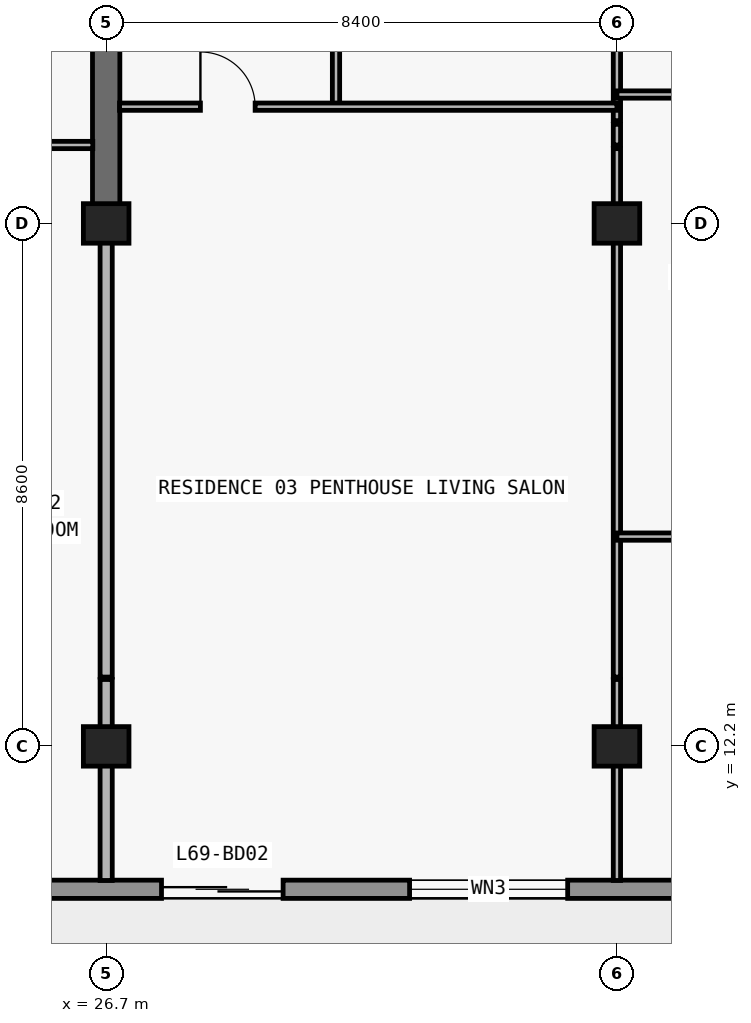
"""IFC4 building model, lengths in metres.
Left out: names, types, materials, properties, quantities, classifications, styles, units other than length and angle.
Written with IfcOpenShell. Run it as: python <this file> out.ifc"""

import sys

from ifc_helpers import new_model, si_unit, direction, frame, frame_2d, origin, origin_2d, place, context, subcontext, project, spatial, rectangle, extrude, element, fill, save


model = new_model("IFC4")
c1 = context("Model", 3, precision=1e-05, world=origin(), true_north=direction((0.0, 1.0)))
c2 = subcontext(c1, "Body", "Model", "MODEL_VIEW")
j1 = project(units=[si_unit("LENGTHUNIT", "METRE"), si_unit("PLANEANGLEUNIT", "RADIAN")], contexts=[c1])
p1 = place(None, origin())
s1 = spatial("IfcSite", under=j1, at=p1, CompositionType="ELEMENT")
p2 = place(p1, origin())
s2 = spatial("IfcBuilding", under=s1, at=p2, CompositionType="ELEMENT")
p3 = place(p2, frame((0.0, 0.0, 246.3)))
s3 = spatial("IfcBuildingStorey", under=s2, at=p3, CompositionType="ELEMENT", Elevation=246.3)
for number, where, z_axis, x_axis in (
    (1, (26.7, 12.2, 0.0), (0.0, 0.0, 1.0), (1.0, 0.0, 0.0)),
    (2, (35.1, 12.2, 0.0), (0.0, 0.0, 1.0), (1.0, 0.0, 0.0)),
    (3, (26.7, 20.8, 0.0), (0.0, 0.0, 1.0), (1.0, 0.0, 0.0)),
    (4, (35.1, 20.8, 0.0), (0.0, 0.0, 1.0), (1.0, 0.0, 0.0)),
):
    element("IfcColumn", number, at=place(p3, frame(where, z_axis=z_axis, x_axis=x_axis)), inside=s3, PredefinedType="COLUMN", context=c2, shape_type="SweptSolid", body=[
        extrude(rectangle(XDim=0.75, YDim=0.65, at=origin_2d()), origin(), (0.0, 0.0, 1.0), 3.05),
    ])
p4 = place(p3, frame((26.7, 20.8, 0.0), z_axis=(0.0, 0.0, 1.0), x_axis=(0.0, 1.0, 0.0)))
e5 = element("IfcWall", 5, at=p4, inside=s3, PredefinedType="SHEAR", context=c2, shape_type="SweptSolid", body=[
    extrude(rectangle(XDim=8.6, YDim=0.45, at=frame_2d((4.3, 0.0))), origin(), (0.0, 0.0, 1.0), 3.05),
])
p5 = place(p3, frame((65.7, 9.85, 0.0), z_axis=(0.0, 0.0, 1.0), x_axis=(-1.0, 0.0, 0.0)))
e6 = element("IfcWall", 6, at=p5, inside=s3, PredefinedType="STANDARD", context=c2, shape_type="SweptSolid", body=[
    extrude(rectangle(XDim=53.6, YDim=0.3, at=frame_2d((26.8, 0.0))), origin(), (0.0, 0.0, 1.0), 3.05),
])
p6 = place(p5, frame((48.05, 0.0, 0.85)))
e7 = element("IfcOpeningElement", 7, at=p6, cuts=e6, PredefinedType="OPENING", context=c2, shape_type="SweptSolid", body=[
    extrude(rectangle(XDim=1.8, YDim=1.55, at=frame_2d((0.9, 0.775))), frame((0.0, 0.16, 0.0), z_axis=(0.0, -1.0, 0.0), x_axis=(1.0, 0.0, 0.0)), (0.0, 0.0, 1.0), 0.32),
])
p7 = place(p5, frame((44.09, 0.0, 0.0)))
e8 = element("IfcOpeningElement", 8, at=p7, cuts=e6, PredefinedType="OPENING", context=c2, shape_type="SweptSolid", body=[
    extrude(rectangle(XDim=2.0, YDim=2.3, at=frame_2d((1.0, 1.15))), frame((0.0, 0.16, 0.0), z_axis=(0.0, -1.0, 0.0), x_axis=(1.0, 0.0, 0.0)), (0.0, 0.0, 1.0), 0.32),
])
p8 = place(p5, frame((39.99, 0.0, 0.85)))
e9 = element("IfcOpeningElement", 9, at=p8, cuts=e6, PredefinedType="OPENING", context=c2, shape_type="SweptSolid", body=[
    extrude(rectangle(XDim=1.8, YDim=1.55, at=frame_2d((0.9, 0.775))), frame((0.0, 0.16, 0.0), z_axis=(0.0, -1.0, 0.0), x_axis=(1.0, 0.0, 0.0)), (0.0, 0.0, 1.0), 0.32),
])
p9 = place(p5, frame((36.09, 0.0, 0.0)))
e10 = element("IfcOpeningElement", 10, at=p9, cuts=e6, PredefinedType="OPENING", context=c2, shape_type="SweptSolid", body=[
    extrude(rectangle(XDim=2.0, YDim=2.3, at=frame_2d((1.0, 1.15))), frame((0.0, 0.16, 0.0), z_axis=(0.0, -1.0, 0.0), x_axis=(1.0, 0.0, 0.0)), (0.0, 0.0, 1.0), 0.32),
])
p10 = place(p5, frame((31.41, 0.0, 0.65)))
e11 = element("IfcOpeningElement", 11, at=p10, cuts=e6, PredefinedType="OPENING", context=c2, shape_type="SweptSolid", body=[
    extrude(rectangle(XDim=2.6, YDim=1.85, at=frame_2d((1.3, 0.925))), frame((0.0, 0.16, 0.0), z_axis=(0.0, -1.0, 0.0), x_axis=(1.0, 0.0, 0.0)), (0.0, 0.0, 1.0), 0.32),
])
p11 = place(p5, frame((25.7, 0.0, 0.85)))
e12 = element("IfcOpeningElement", 12, at=p11, cuts=e6, PredefinedType="OPENING", context=c2, shape_type="SweptSolid", body=[
    extrude(rectangle(XDim=2.2, YDim=1.55, at=frame_2d((1.1, 0.775))), frame((0.0, 0.16, 0.0), z_axis=(0.0, -1.0, 0.0), x_axis=(1.0, 0.0, 0.0)), (0.0, 0.0, 1.0), 0.32),
])
p12 = place(p5, frame((17.7, 0.0, 0.85)))
e13 = element("IfcOpeningElement", 13, at=p12, cuts=e6, PredefinedType="OPENING", context=c2, shape_type="SweptSolid", body=[
    extrude(rectangle(XDim=2.2, YDim=1.55, at=frame_2d((1.1, 0.775))), frame((0.0, 0.16, 0.0), z_axis=(0.0, -1.0, 0.0), x_axis=(1.0, 0.0, 0.0)), (0.0, 0.0, 1.0), 0.32),
])
p13 = place(p5, frame((11.29, 0.0, 0.0)))
e14 = element("IfcOpeningElement", 14, at=p13, cuts=e6, PredefinedType="OPENING", context=c2, shape_type="SweptSolid", body=[
    extrude(rectangle(XDim=2.0, YDim=2.3, at=frame_2d((1.0, 1.15))), frame((0.0, 0.16, 0.0), z_axis=(0.0, -1.0, 0.0), x_axis=(1.0, 0.0, 0.0)), (0.0, 0.0, 1.0), 0.32),
])
p14 = place(p5, frame((7.19, 0.0, 0.85)))
e15 = element("IfcOpeningElement", 15, at=p14, cuts=e6, PredefinedType="OPENING", context=c2, shape_type="SweptSolid", body=[
    extrude(rectangle(XDim=1.8, YDim=1.55, at=frame_2d((0.9, 0.775))), frame((0.0, 0.16, 0.0), z_axis=(0.0, -1.0, 0.0), x_axis=(1.0, 0.0, 0.0)), (0.0, 0.0, 1.0), 0.32),
])
p15 = place(p5, frame((0.65, 0.0, 0.85)))
e16 = element("IfcOpeningElement", 16, at=p15, cuts=e6, PredefinedType="OPENING", context=c2, shape_type="SweptSolid", body=[
    extrude(rectangle(XDim=1.8, YDim=1.55, at=frame_2d((0.9, 0.775))), frame((0.0, 0.16, 0.0), z_axis=(0.0, -1.0, 0.0), x_axis=(1.0, 0.0, 0.0)), (0.0, 0.0, 1.0), 0.32),
])
p16 = place(p3, frame((26.7, 9.995, 0.0), z_axis=(0.0, 0.0, 1.0), x_axis=(0.0, 1.0, 0.0)))
e17 = element("IfcWall", 17, at=p16, inside=s3, PredefinedType="PARTITIONING", context=c2, shape_type="SweptSolid", body=[
    extrude(rectangle(XDim=3.305, YDim=0.2, at=frame_2d((1.652, 0.0))), origin(), (0.0, 0.0, 1.0), 2.263),
])
p17 = place(p3, frame((26.7, 13.34, 0.0), z_axis=(0.0, 0.0, 1.0), x_axis=(0.0, 1.0, 0.0)))
e18 = element("IfcWall", 18, at=p17, inside=s3, PredefinedType="PARTITIONING", context=c2, shape_type="SweptSolid", body=[
    extrude(rectangle(XDim=7.455, YDim=0.2, at=frame_2d((3.728, 0.0))), origin(), (0.0, 0.0, 1.0), 2.263),
])
p18 = place(p3, frame((30.48, 22.72, 0.0), z_axis=(0.0, 0.0, 1.0), x_axis=(0.0, 1.0, 0.0)))
e19 = element("IfcWall", 19, at=p18, inside=s3, PredefinedType="PARTITIONING", context=c2, shape_type="SweptSolid", body=[
    extrude(rectangle(XDim=4.46, YDim=0.12, at=frame_2d((2.23, 0.0))), origin(), (0.0, 0.0, 1.0), 3.05),
])
p19 = place(p18, frame((1.78, 0.0, 0.0)))
e20 = element("IfcOpeningElement", 20, at=p19, cuts=e19, PredefinedType="OPENING", context=c2, shape_type="SweptSolid", body=[
    extrude(rectangle(XDim=0.9, YDim=2.15, at=frame_2d((0.45, 1.075))), frame((0.0, 0.07, 0.0), z_axis=(0.0, -1.0, 0.0), x_axis=(1.0, 0.0, 0.0)), (0.0, 0.0, 1.0), 0.14),
])
p20 = place(p3, frame((35.1, 9.995, 0.0), z_axis=(0.0, 0.0, 1.0), x_axis=(0.0, 1.0, 0.0)))
e21 = element("IfcWall", 21, at=p20, inside=s3, PredefinedType="PARTITIONING", context=c2, shape_type="SweptSolid", body=[
    extrude(rectangle(XDim=3.305, YDim=0.12, at=frame_2d((1.652, 0.0))), origin(), (0.0, 0.0, 1.0), 2.263),
])
p21 = place(p3, frame((35.1, 13.34, 0.0), z_axis=(0.0, 0.0, 1.0), x_axis=(0.0, 1.0, 0.0)))
e22 = element("IfcWall", 22, at=p21, inside=s3, PredefinedType="PARTITIONING", context=c2, shape_type="SweptSolid", body=[
    extrude(rectangle(XDim=8.69, YDim=0.12, at=frame_2d((4.345, 0.0))), origin(), (0.0, 0.0, 1.0), 2.263),
])
p22 = place(p3, frame((35.1, 22.09, 0.0), z_axis=(0.0, 0.0, 1.0), x_axis=(0.0, 1.0, 0.0)))
e23 = element("IfcWall", 23, at=p22, inside=s3, PredefinedType="PARTITIONING", context=c2, shape_type="SweptSolid", body=[
    extrude(rectangle(XDim=0.34, YDim=0.12, at=frame_2d((0.17, 0.0))), origin(), (0.0, 0.0, 1.0), 2.263),
])
p23 = place(p3, frame((35.1, 22.49, 0.0), z_axis=(0.0, 0.0, 1.0), x_axis=(0.0, 1.0, 0.0)))
e24 = element("IfcWall", 24, at=p23, inside=s3, PredefinedType="PARTITIONING", context=c2, shape_type="SweptSolid", body=[
    extrude(rectangle(XDim=4.69, YDim=0.12, at=frame_2d((2.345, 0.0))), origin(), (0.0, 0.0, 1.0), 2.263),
])
p24 = place(p23, frame((2.11, 0.0, 0.0)))
e25 = element("IfcOpeningElement", 25, at=p24, cuts=e24, PredefinedType="OPENING", context=c2, shape_type="SweptSolid", body=[
    extrude(rectangle(XDim=0.9, YDim=2.15, at=frame_2d((0.45, 1.075))), frame((0.0, 0.07, 0.0), z_axis=(0.0, -1.0, 0.0), x_axis=(1.0, 0.0, 0.0)), (0.0, 0.0, 1.0), 0.14),
])
p25 = place(p3, frame((35.1, 15.65, 0.0), z_axis=(0.0, 0.0, 1.0), x_axis=(1.0, 0.0, 0.0)))
e26 = element("IfcWall", 26, at=p25, inside=s3, PredefinedType="PARTITIONING", context=c2, shape_type="SweptSolid", body=[
    extrude(rectangle(XDim=6.095, YDim=0.12, at=frame_2d((3.047, 0.0))), origin(), (0.0, 0.0, 1.0), 3.05),
])
p26 = place(p25, frame((2.597, 0.0, 0.0)))
e27 = element("IfcOpeningElement", 27, at=p26, cuts=e26, PredefinedType="OPENING", context=c2, shape_type="SweptSolid", body=[
    extrude(rectangle(XDim=0.9, YDim=2.15, at=frame_2d((0.45, 1.075))), frame((0.0, 0.07, 0.0), z_axis=(0.0, -1.0, 0.0), x_axis=(1.0, 0.0, 0.0)), (0.0, 0.0, 1.0), 0.14),
])
p27 = place(p3, frame((18.3, 22.09, 0.0), z_axis=(0.0, 0.0, 1.0), x_axis=(1.0, 0.0, 0.0)))
e28 = element("IfcWall", 28, at=p27, inside=s3, PredefinedType="PARTITIONING", context=c2, shape_type="SweptSolid", body=[
    extrude(rectangle(XDim=8.18, YDim=0.12, at=frame_2d((4.09, 0.0))), origin(), (0.0, 0.0, 1.0), 3.05),
])
p28 = place(p27, frame((1.818, 0.0, 0.0)))
e29 = element("IfcOpeningElement", 29, at=p28, cuts=e28, PredefinedType="OPENING", context=c2, shape_type="SweptSolid", body=[
    extrude(rectangle(XDim=0.9, YDim=2.15, at=frame_2d((0.45, 1.075))), frame((0.0, 0.07, 0.0), z_axis=(0.0, -1.0, 0.0), x_axis=(1.0, 0.0, 0.0)), (0.0, 0.0, 1.0), 0.14),
])
p29 = place(p27, frame((5.95, 0.0, 0.0)))
e30 = element("IfcOpeningElement", 30, at=p29, cuts=e28, PredefinedType="OPENING", context=c2, shape_type="SweptSolid", body=[
    extrude(rectangle(XDim=0.9, YDim=2.15, at=frame_2d((0.45, 1.075))), frame((0.0, 0.07, 0.0), z_axis=(0.0, -1.0, 0.0), x_axis=(1.0, 0.0, 0.0)), (0.0, 0.0, 1.0), 0.14),
])
p30 = place(p3, frame((26.92, 22.72, 0.0), z_axis=(0.0, 0.0, 1.0), x_axis=(1.0, 0.0, 0.0)))
e31 = element("IfcWall", 31, at=p30, inside=s3, PredefinedType="PARTITIONING", context=c2, shape_type="SweptSolid", body=[
    extrude(rectangle(XDim=8.18, YDim=0.12, at=frame_2d((4.09, 0.0))), origin(), (0.0, 0.0, 1.0), 3.05),
])
p31 = place(p30, frame((1.33, 0.0, 0.0)))
e32 = element("IfcOpeningElement", 32, at=p31, cuts=e31, PredefinedType="OPENING", context=c2, shape_type="SweptSolid", body=[
    extrude(rectangle(XDim=0.9, YDim=2.15, at=frame_2d((0.45, 1.075))), frame((0.0, 0.07, 0.0), z_axis=(0.0, -1.0, 0.0), x_axis=(1.0, 0.0, 0.0)), (0.0, 0.0, 1.0), 0.14),
])
p32 = place(p3, frame((35.1, 22.92, 0.0), z_axis=(0.0, 0.0, 1.0), x_axis=(1.0, 0.0, 0.0)))
e33 = element("IfcWall", 33, at=p32, inside=s3, PredefinedType="PARTITIONING", context=c2, shape_type="SweptSolid", body=[
    extrude(rectangle(XDim=6.095, YDim=0.12, at=frame_2d((3.047, 0.0))), origin(), (0.0, 0.0, 1.0), 3.05),
])
p33 = place(p32, frame((2.597, 0.0, 0.0)))
e34 = element("IfcOpeningElement", 34, at=p33, cuts=e33, PredefinedType="OPENING", context=c2, shape_type="SweptSolid", body=[
    extrude(rectangle(XDim=0.9, YDim=2.15, at=frame_2d((0.45, 1.075))), frame((0.0, 0.07, 0.0), z_axis=(0.0, -1.0, 0.0), x_axis=(1.0, 0.0, 0.0)), (0.0, 0.0, 1.0), 0.14),
])
p34 = place(p9, origin())
e35 = element("IfcDoor", 35, at=p34, inside=s3, OperationType="DOUBLE_DOOR_SLIDING", PredefinedType="DOOR", context=c2, shape_type="SweptSolid", body=[
    extrude(rectangle(XDim=2.0, YDim=2.3, at=frame_2d((1.0, 1.15))), frame((0.0, 0.025, 0.0), z_axis=(0.0, -1.0, 0.0), x_axis=(1.0, 0.0, 0.0)), (0.0, 0.0, 1.0), 0.05),
])
fill(e10, e35)
p35 = place(p10, origin())
e36 = element("IfcWindow", 36, at=p35, inside=s3, PartitioningType="SINGLE_PANEL", PredefinedType="WINDOW", context=c2, shape_type="SweptSolid", body=[
    extrude(rectangle(XDim=2.6, YDim=1.85, at=frame_2d((1.3, 0.925))), frame((0.0, 0.03, 0.0), z_axis=(0.0, -1.0, 0.0), x_axis=(1.0, 0.0, 0.0)), (0.0, 0.0, 1.0), 0.06),
])
fill(e11, e36)
p36 = place(p31, origin())
e37 = element("IfcDoor", 37, at=p36, inside=s3, OperationType="SINGLE_SWING_LEFT", PredefinedType="DOOR", context=c2, shape_type="SweptSolid", body=[
    extrude(rectangle(XDim=0.9, YDim=2.15, at=frame_2d((0.45, 1.075))), frame((0.0, 0.025, 0.0), z_axis=(0.0, -1.0, 0.0), x_axis=(1.0, 0.0, 0.0)), (0.0, 0.0, 1.0), 0.05),
])
fill(e32, e37)
save(model, sys.argv[1])
